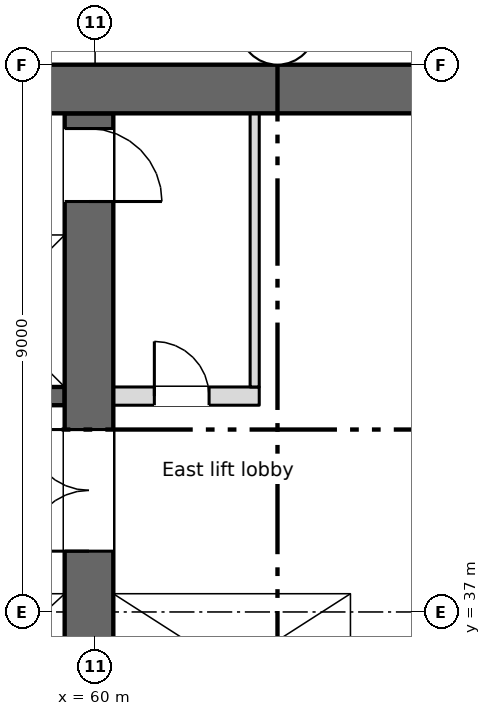
"""IFC4 building model, lengths in metres.
Left out: names, types, materials, properties, quantities, classifications, styles, units other than length and angle.
Written with IfcOpenShell. Run it as: python <this file> out.ifc"""

import sys

from ifc_helpers import new_model, si_unit, direction, frame, frame_2d, origin, place, context, subcontext, project, spatial, rectangle, extrude, element, fill, save


model = new_model("IFC4")
c1 = context("Model", 3, precision=1e-05, world=origin(), true_north=direction((0.0, 1.0)))
c2 = subcontext(c1, "Body", "Model", "MODEL_VIEW")
j1 = project(units=[si_unit("LENGTHUNIT", "METRE"), si_unit("PLANEANGLEUNIT", "RADIAN")], contexts=[c1])
p1 = place(None, origin())
s1 = spatial("IfcSite", under=j1, at=p1, CompositionType="ELEMENT")
p2 = place(p1, origin())
s2 = spatial("IfcBuilding", under=s1, at=p2, CompositionType="ELEMENT")
p3 = place(p2, frame((0.0, 0.0, 147.5)))
s3 = spatial("IfcBuildingStorey", under=s2, at=p3, CompositionType="ELEMENT", Elevation=147.5)
p4 = place(p3, frame((5.55, 45.6, 0.0), z_axis=(0.0, 0.0, 1.0), x_axis=(1.0, 0.0, 0.0)))
e1 = element("IfcWall", 1, at=p4, inside=s3, PredefinedType="SHEAR", context=c2, shape_type="SweptSolid", body=[
    extrude(rectangle(XDim=60.9, YDim=0.8, at=frame_2d((30.45, 0.0))), origin(), (0.0, 0.0, 1.0), 3.35),
])
p5 = place(p4, frame((1.2, 0.0, 0.6)))
e2 = element("IfcOpeningElement", 2, at=p5, cuts=e1, PredefinedType="OPENING", context=c2, shape_type="SweptSolid", body=[
    extrude(rectangle(XDim=0.6, YDim=2.4, at=frame_2d((0.3, 1.2))), frame((0.0, 0.41, 0.0), z_axis=(0.0, -1.0, 0.0), x_axis=(1.0, 0.0, 0.0)), (0.0, 0.0, 1.0), 0.82),
])
p6 = place(p4, frame((7.2, 0.0, 0.6)))
e3 = element("IfcOpeningElement", 3, at=p6, cuts=e1, PredefinedType="OPENING", context=c2, shape_type="SweptSolid", body=[
    extrude(rectangle(XDim=0.6, YDim=2.4, at=frame_2d((0.3, 1.2))), frame((0.0, 0.41, 0.0), z_axis=(0.0, -1.0, 0.0), x_axis=(1.0, 0.0, 0.0)), (0.0, 0.0, 1.0), 0.82),
])
p7 = place(p3, frame((64.35, 34.8, 0.0), z_axis=(0.0, 0.0, 1.0), x_axis=(0.0, 1.0, 0.0)))
e4 = element("IfcWall", 4, at=p7, inside=s3, PredefinedType="SHEAR", context=c2, shape_type="SweptSolid", body=[
    extrude(rectangle(XDim=10.4, YDim=0.3, at=frame_2d((5.2, 0.0))), origin(), (0.0, 0.0, 1.0), 3.35),
])
p8 = place(p3, frame((59.9, 28.4, 0.0), z_axis=(0.0, 0.0, 1.0), x_axis=(0.0, 1.0, 0.0)))
e5 = element("IfcWall", 5, at=p8, inside=s3, PredefinedType="SHEAR", context=c2, shape_type="SweptSolid", body=[
    extrude(rectangle(XDim=16.8, YDim=0.8, at=frame_2d((8.4, 0.0))), origin(), (0.0, 0.0, 1.0), 3.35),
])
p9 = place(p8, frame((9.6, 0.0, 0.0)))
e6 = element("IfcOpeningElement", 6, at=p9, cuts=e5, PredefinedType="OPENING", context=c2, shape_type="SweptSolid", body=[
    extrude(rectangle(XDim=2.0, YDim=2.1, at=frame_2d((1.0, 1.05))), frame((0.0, 0.41, 0.0), z_axis=(0.0, -1.0, 0.0), x_axis=(1.0, 0.0, 0.0)), (0.0, 0.0, 1.0), 0.82),
])
p10 = place(p8, frame((15.35, 0.0, 0.0)))
e7 = element("IfcOpeningElement", 7, at=p10, cuts=e5, PredefinedType="OPENING", context=c2, shape_type="SweptSolid", body=[
    extrude(rectangle(XDim=1.2, YDim=2.1, at=frame_2d((0.6, 1.05))), frame((0.0, 0.41, 0.0), z_axis=(0.0, -1.0, 0.0), x_axis=(1.0, 0.0, 0.0)), (0.0, 0.0, 1.0), 0.82),
])
p11 = place(p3, frame((47.3, 37.45, 0.0), z_axis=(0.0, 0.0, 1.0), x_axis=(1.0, 0.0, 0.0)))
e8 = element("IfcWall", 8, at=p11, inside=s3, PredefinedType="SHEAR", context=c2, shape_type="SweptSolid", body=[
    extrude(rectangle(XDim=12.2, YDim=0.3, at=frame_2d((6.1, 0.0))), origin(), (0.0, 0.0, 1.0), 3.35),
])
p12 = place(p11, frame((4.3, 0.0, 0.0)))
e9 = element("IfcOpeningElement", 9, at=p12, cuts=e8, PredefinedType="OPENING", context=c2, shape_type="SweptSolid", body=[
    extrude(rectangle(XDim=1.1, YDim=2.1, at=frame_2d((0.55, 1.05))), frame((0.0, 0.16, 0.0), z_axis=(0.0, -1.0, 0.0), x_axis=(1.0, 0.0, 0.0)), (0.0, 0.0, 1.0), 0.32),
])
p13 = place(p11, frame((7.3, 0.0, 0.0)))
e10 = element("IfcOpeningElement", 10, at=p13, cuts=e8, PredefinedType="OPENING", context=c2, shape_type="SweptSolid", body=[
    extrude(rectangle(XDim=1.1, YDim=2.1, at=frame_2d((0.55, 1.05))), frame((0.0, 0.16, 0.0), z_axis=(0.0, -1.0, 0.0), x_axis=(1.0, 0.0, 0.0)), (0.0, 0.0, 1.0), 0.32),
])
p14 = place(p11, frame((10.3, 0.0, 0.0)))
e11 = element("IfcOpeningElement", 11, at=p14, cuts=e8, PredefinedType="OPENING", context=c2, shape_type="SweptSolid", body=[
    extrude(rectangle(XDim=1.1, YDim=2.1, at=frame_2d((0.55, 1.05))), frame((0.0, 0.16, 0.0), z_axis=(0.0, -1.0, 0.0), x_axis=(1.0, 0.0, 0.0)), (0.0, 0.0, 1.0), 0.32),
])
p15 = place(p3, frame((60.3, 37.45, 0.0), z_axis=(0.0, 0.0, 1.0), x_axis=(1.0, 0.0, 0.0)))
e12 = element("IfcWall", 12, at=p15, inside=s3, PredefinedType="SHEAR", context=c2, shape_type="SweptSolid", body=[
    extrude(rectangle(XDim=3.9, YDim=0.3, at=frame_2d((1.95, 0.0))), origin(), (0.0, 0.0, 1.0), 3.35),
])
p16 = place(p15, frame((1.4, 0.0, 0.0)))
e13 = element("IfcOpeningElement", 13, at=p16, cuts=e12, PredefinedType="OPENING", context=c2, shape_type="SweptSolid", body=[
    extrude(rectangle(XDim=1.1, YDim=2.1, at=frame_2d((0.55, 1.05))), frame((0.0, 0.16, 0.0), z_axis=(0.0, -1.0, 0.0), x_axis=(1.0, 0.0, 0.0)), (0.0, 0.0, 1.0), 0.32),
])
p17 = place(p3, frame((18.5, 40.55, 0.0), z_axis=(0.0, 0.0, 1.0), x_axis=(1.0, 0.0, 0.0)))
e14 = element("IfcWall", 14, at=p17, inside=s3, PredefinedType="SHEAR", context=c2, shape_type="SweptSolid", body=[
    extrude(rectangle(XDim=41.0, YDim=0.3, at=frame_2d((20.5, 0.0))), origin(), (0.0, 0.0, 1.0), 3.35),
])
p18 = place(p17, frame((18.65, 0.0, 0.0)))
e15 = element("IfcOpeningElement", 15, at=p18, cuts=e14, PredefinedType="OPENING", context=c2, shape_type="SweptSolid", body=[
    extrude(rectangle(XDim=0.9, YDim=2.1, at=frame_2d((0.45, 1.05))), frame((0.0, 0.16, 0.0), z_axis=(0.0, -1.0, 0.0), x_axis=(1.0, 0.0, 0.0)), (0.0, 0.0, 1.0), 0.32),
])
p19 = place(p17, frame((6.175, 0.0, 0.0)))
e16 = element("IfcOpeningElement", 16, at=p19, cuts=e14, PredefinedType="OPENING", context=c2, shape_type="SweptSolid", body=[
    extrude(rectangle(XDim=1.1, YDim=2.1, at=frame_2d((0.55, 1.05))), frame((0.0, 0.16, 0.0), z_axis=(0.0, -1.0, 0.0), x_axis=(1.0, 0.0, 0.0)), (0.0, 0.0, 1.0), 0.32),
])
p20 = place(p17, frame((8.925, 0.0, 0.0)))
e17 = element("IfcOpeningElement", 17, at=p20, cuts=e14, PredefinedType="OPENING", context=c2, shape_type="SweptSolid", body=[
    extrude(rectangle(XDim=1.1, YDim=2.1, at=frame_2d((0.55, 1.05))), frame((0.0, 0.16, 0.0), z_axis=(0.0, -1.0, 0.0), x_axis=(1.0, 0.0, 0.0)), (0.0, 0.0, 1.0), 0.32),
])
p21 = place(p17, frame((11.675, 0.0, 0.0)))
e18 = element("IfcOpeningElement", 18, at=p21, cuts=e14, PredefinedType="OPENING", context=c2, shape_type="SweptSolid", body=[
    extrude(rectangle(XDim=1.1, YDim=2.1, at=frame_2d((0.55, 1.05))), frame((0.0, 0.16, 0.0), z_axis=(0.0, -1.0, 0.0), x_axis=(1.0, 0.0, 0.0)), (0.0, 0.0, 1.0), 0.32),
])
p22 = place(p17, frame((30.925, 0.0, 0.0)))
e19 = element("IfcOpeningElement", 19, at=p22, cuts=e14, PredefinedType="OPENING", context=c2, shape_type="SweptSolid", body=[
    extrude(rectangle(XDim=1.1, YDim=2.1, at=frame_2d((0.55, 1.05))), frame((0.0, 0.16, 0.0), z_axis=(0.0, -1.0, 0.0), x_axis=(1.0, 0.0, 0.0)), (0.0, 0.0, 1.0), 0.32),
])
p23 = place(p17, frame((33.675, 0.0, 0.0)))
e20 = element("IfcOpeningElement", 20, at=p23, cuts=e14, PredefinedType="OPENING", context=c2, shape_type="SweptSolid", body=[
    extrude(rectangle(XDim=1.1, YDim=2.1, at=frame_2d((0.55, 1.05))), frame((0.0, 0.16, 0.0), z_axis=(0.0, -1.0, 0.0), x_axis=(1.0, 0.0, 0.0)), (0.0, 0.0, 1.0), 0.32),
])
p24 = place(p17, frame((36.375, 0.0, 0.0)))
e21 = element("IfcOpeningElement", 21, at=p24, cuts=e14, PredefinedType="OPENING", context=c2, shape_type="SweptSolid", body=[
    extrude(rectangle(XDim=1.2, YDim=2.1, at=frame_2d((0.6, 1.05))), frame((0.0, 0.16, 0.0), z_axis=(0.0, -1.0, 0.0), x_axis=(1.0, 0.0, 0.0)), (0.0, 0.0, 1.0), 0.32),
])
p25 = place(p17, frame((39.15, 0.0, 0.0)))
e22 = element("IfcOpeningElement", 22, at=p25, cuts=e14, PredefinedType="OPENING", context=c2, shape_type="SweptSolid", body=[
    extrude(rectangle(XDim=1.2, YDim=2.1, at=frame_2d((0.6, 1.05))), frame((0.0, 0.16, 0.0), z_axis=(0.0, -1.0, 0.0), x_axis=(1.0, 0.0, 0.0)), (0.0, 0.0, 1.0), 0.32),
])
p26 = place(p3, frame((18.5, 43.35, 0.0), z_axis=(0.0, 0.0, 1.0), x_axis=(1.0, 0.0, 0.0)))
e23 = element("IfcWall", 23, at=p26, inside=s3, PredefinedType="SHEAR", context=c2, shape_type="SweptSolid", body=[
    extrude(rectangle(XDim=41.0, YDim=0.3, at=frame_2d((20.5, 0.0))), origin(), (0.0, 0.0, 1.0), 3.35),
])
p27 = place(p3, frame((60.3, 40.55, 0.0), z_axis=(0.0, 0.0, 1.0), x_axis=(1.0, 0.0, 0.0)))
e24 = element("IfcWall", 24, at=p27, inside=s3, PredefinedType="PARTITIONING", context=c2, shape_type="SweptSolid", body=[
    extrude(rectangle(XDim=2.4, YDim=0.3, at=frame_2d((1.2, 0.0))), origin(), (0.0, 0.0, 1.0), 3.35),
])
p28 = place(p27, frame((0.675, 0.0, 0.0)))
e25 = element("IfcOpeningElement", 25, at=p28, cuts=e24, PredefinedType="OPENING", context=c2, shape_type="SweptSolid", body=[
    extrude(rectangle(XDim=0.9, YDim=2.1, at=frame_2d((0.45, 1.05))), frame((0.0, 0.16, 0.0), z_axis=(0.0, -1.0, 0.0), x_axis=(1.0, 0.0, 0.0)), (0.0, 0.0, 1.0), 0.32),
])
p29 = place(p3, frame((62.625, 40.7, 0.0), z_axis=(0.0, 0.0, 1.0), x_axis=(0.0, 1.0, 0.0)))
e26 = element("IfcWall", 26, at=p29, inside=s3, PredefinedType="PARTITIONING", context=c2, shape_type="SweptSolid", body=[
    extrude(rectangle(XDim=4.5, YDim=0.15, at=frame_2d((2.25, 0.0))), origin(), (0.0, 0.0, 1.0), 3.35),
])
p30 = place(p28, origin())
e27 = element("IfcDoor", 27, at=p30, inside=s3, OperationType="SINGLE_SWING_LEFT", PredefinedType="DOOR", context=c2, shape_type="SweptSolid", body=[
    extrude(rectangle(XDim=0.9, YDim=2.1, at=frame_2d((0.45, 1.05))), frame((0.0, 0.025, 0.0), z_axis=(0.0, -1.0, 0.0), x_axis=(1.0, 0.0, 0.0)), (0.0, 0.0, 1.0), 0.05),
])
fill(e25, e27)
p31 = place(p16, origin())
e28 = element("IfcDoor", 28, at=p31, inside=s3, OperationType="SLIDING_TO_LEFT", PredefinedType="DOOR", context=c2, shape_type="SweptSolid", body=[
    extrude(rectangle(XDim=1.1, YDim=2.1, at=frame_2d((0.55, 1.05))), frame((0.0, 0.025, 0.0), z_axis=(0.0, -1.0, 0.0), x_axis=(1.0, 0.0, 0.0)), (0.0, 0.0, 1.0), 0.05),
])
fill(e13, e28)
p32 = place(p9, origin())
e29 = element("IfcDoor", 29, at=p32, inside=s3, OperationType="DOUBLE_DOOR_SINGLE_SWING", PredefinedType="DOOR", context=c2, shape_type="SweptSolid", body=[
    extrude(rectangle(XDim=2.0, YDim=2.1, at=frame_2d((1.0, 1.05))), frame((0.0, 0.025, 0.0), z_axis=(0.0, -1.0, 0.0), x_axis=(1.0, 0.0, 0.0)), (0.0, 0.0, 1.0), 0.05),
])
fill(e6, e29)
p33 = place(p10, origin())
e30 = element("IfcDoor", 30, at=p33, inside=s3, OperationType="SINGLE_SWING_LEFT", PredefinedType="DOOR", context=c2, shape_type="SweptSolid", body=[
    extrude(rectangle(XDim=1.2, YDim=2.1, at=frame_2d((0.6, 1.05))), frame((0.0, 0.025, 0.0), z_axis=(0.0, -1.0, 0.0), x_axis=(1.0, 0.0, 0.0)), (0.0, 0.0, 1.0), 0.05),
])
fill(e7, e30)
save(model, sys.argv[1])
